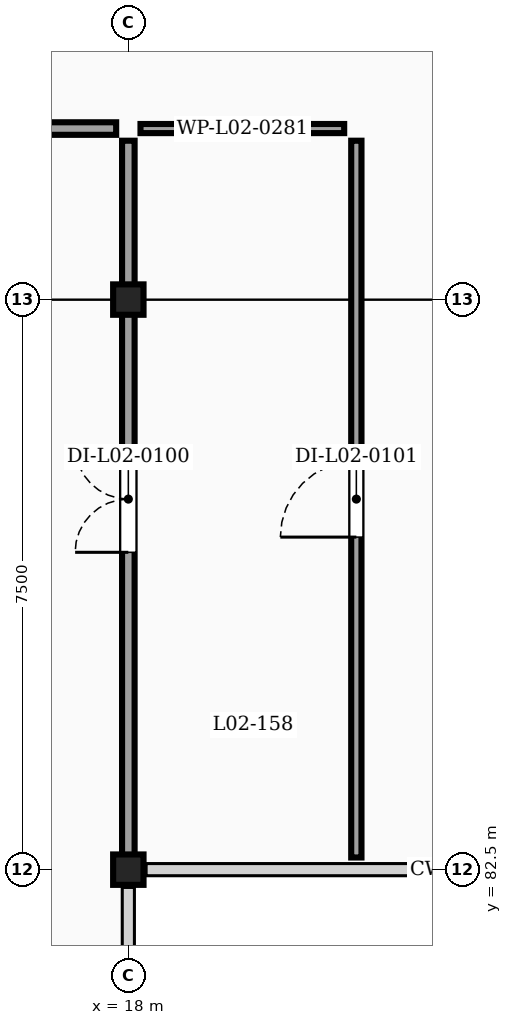
"""IFC4 building model, lengths in metres.
Left out: names, types, materials, properties, quantities, classifications, styles, units other than length and angle.
Written with IfcOpenShell. Run it as: python <this file> out.ifc"""

import sys

from ifc_helpers import new_model, si_unit, direction, frame, frame_2d, origin, origin_2d, place, context, subcontext, project, spatial, rectangle, extrude, element, fill, save


model = new_model("IFC4")
c1 = context("Model", 3, precision=1e-05, world=origin(), true_north=direction((0.0, 1.0)))
c2 = subcontext(c1, "Body", "Model", "MODEL_VIEW")
j1 = project(units=[si_unit("LENGTHUNIT", "METRE"), si_unit("PLANEANGLEUNIT", "RADIAN")], contexts=[c1])
p1 = place(None, origin())
s1 = spatial("IfcSite", under=j1, at=p1, CompositionType="ELEMENT")
p2 = place(p1, origin())
s2 = spatial("IfcBuilding", under=s1, at=p2, CompositionType="ELEMENT")
p3 = place(p2, frame((0.0, 0.0, 8.5)))
s3 = spatial("IfcBuildingStorey", under=s2, at=p3, CompositionType="ELEMENT", Elevation=8.5)
for number, where, z_axis, x_axis in (
    (1, (18.0, 82.5, 0.0), (0.0, 0.0, 1.0), (1.0, 0.0, 0.0)),
    (2, (18.0, 90.0, 0.0), (0.0, 0.0, 1.0), (1.0, 0.0, 0.0)),
):
    element("IfcColumn", number, at=place(p3, frame(where, z_axis=z_axis, x_axis=x_axis)), inside=s3, PredefinedType="COLUMN", context=c2, shape_type="SweptSolid", body=[
        extrude(rectangle(XDim=0.4, YDim=0.4, at=origin_2d()), origin(), (0.0, 0.0, 1.0), 3.8),
    ])
p4 = place(p3, frame((17.84, 92.25, 0.0), z_axis=(0.0, 0.0, 1.0), x_axis=(-1.0, 0.0, 0.0)))
e3 = element("IfcWall", 3, at=p4, inside=s3, PredefinedType="PARTITIONING", context=c2, shape_type="SweptSolid", body=[
    extrude(rectangle(XDim=4.34, YDim=0.165, at=frame_2d((2.17, 0.0))), origin(), (0.0, 0.0, 1.0), 3.58),
])
p5 = place(p3, frame((21.0, 82.66, 0.0), z_axis=(0.0, 0.0, 1.0), x_axis=(0.0, 1.0, 0.0)))
e4 = element("IfcWall", 4, at=p5, inside=s3, PredefinedType="PARTITIONING", context=c2, shape_type="SweptSolid", body=[
    extrude(rectangle(XDim=9.43, YDim=0.135, at=frame_2d((4.715, 0.0))), origin(), (0.0, 0.0, 1.0), 3.172),
])
p6 = place(p5, frame((4.215, 0.0, 0.0)))
e5 = element("IfcOpeningElement", 5, at=p6, cuts=e4, PredefinedType="OPENING", context=c2, shape_type="SweptSolid", body=[
    extrude(rectangle(XDim=1.0, YDim=2.15, at=frame_2d((0.5, 1.075))), frame((0.0, 0.077, 0.0), z_axis=(0.0, -1.0, 0.0), x_axis=(1.0, 0.0, 0.0)), (0.0, 0.0, 1.0), 0.155),
])
p7 = place(p3, frame((20.84, 92.25, 0.0), z_axis=(0.0, 0.0, 1.0), x_axis=(-1.0, 0.0, 0.0)))
e6 = element("IfcWall", 6, at=p7, inside=s3, PredefinedType="PARTITIONING", context=c2, shape_type="SweptSolid", body=[
    extrude(rectangle(XDim=2.68, YDim=0.12, at=frame_2d((1.34, 0.0))), origin(), (0.0, 0.0, 1.0), 3.58),
])
p8 = place(p3, frame((18.0, 82.66, 0.0), z_axis=(0.0, 0.0, 1.0), x_axis=(0.0, 1.0, 0.0)))
e7 = element("IfcWall", 7, at=p8, inside=s3, PredefinedType="PARTITIONING", context=c2, shape_type="SweptSolid", body=[
    extrude(rectangle(XDim=9.43, YDim=0.165, at=frame_2d((4.715, 0.0))), origin(), (0.0, 0.0, 1.0), 2.88),
])
p9 = place(p8, frame((4.015, 0.0, 0.0)))
e8 = element("IfcOpeningElement", 8, at=p9, cuts=e7, PredefinedType="OPENING", context=c2, shape_type="SweptSolid", body=[
    extrude(rectangle(XDim=1.4, YDim=2.15, at=frame_2d((0.7, 1.075))), frame((0.0, 0.093, 0.0), z_axis=(0.0, -1.0, 0.0), x_axis=(1.0, 0.0, 0.0)), (0.0, 0.0, 1.0), 0.185),
])
p10 = place(p9, origin())
e9 = element("IfcDoor", 9, at=p10, inside=s3, OperationType="DOUBLE_DOOR_SINGLE_SWING", PredefinedType="DOOR", context=c2, shape_type="SweptSolid", body=[
    extrude(rectangle(XDim=1.4, YDim=2.15, at=frame_2d((0.7, 1.075))), frame((0.0, 0.025, 0.0), z_axis=(0.0, -1.0, 0.0), x_axis=(1.0, 0.0, 0.0)), (0.0, 0.0, 1.0), 0.05),
])
fill(e8, e9)
p11 = place(p6, origin())
e10 = element("IfcDoor", 10, at=p11, inside=s3, OperationType="SINGLE_SWING_LEFT", PredefinedType="DOOR", context=c2, shape_type="SweptSolid", body=[
    extrude(rectangle(XDim=1.0, YDim=2.15, at=frame_2d((0.5, 1.075))), frame((0.0, 0.025, 0.0), z_axis=(0.0, -1.0, 0.0), x_axis=(1.0, 0.0, 0.0)), (0.0, 0.0, 1.0), 0.05),
])
fill(e5, e10)
save(model, sys.argv[1])
